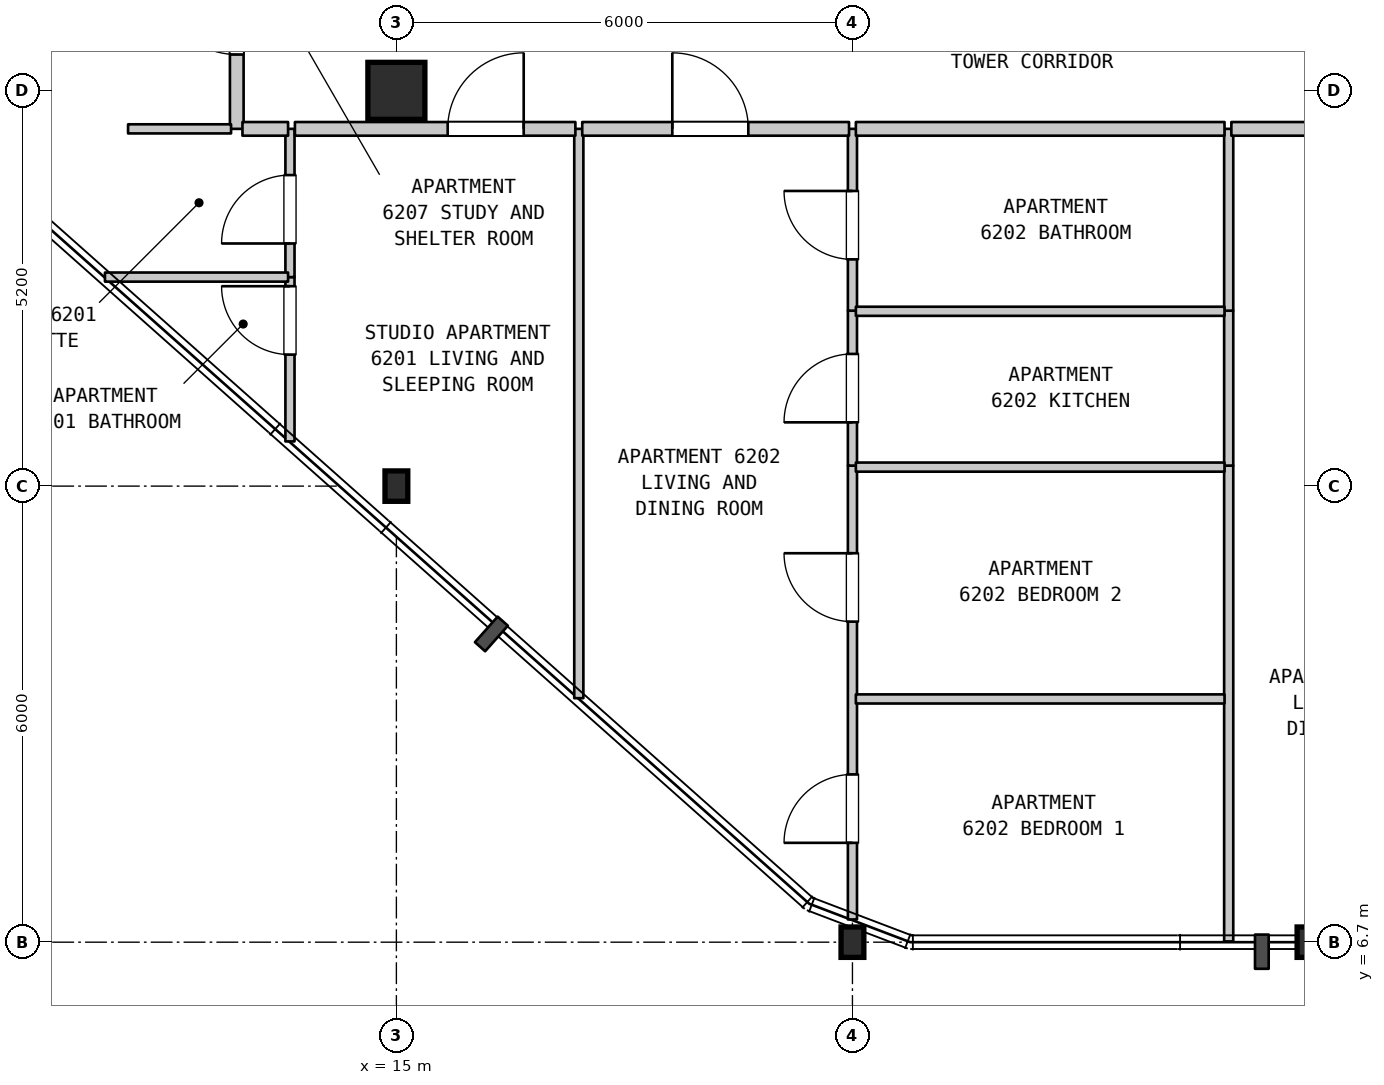
"""IFC4 building model, lengths in metres.
Left out: names, types, materials, properties, quantities, classifications, styles, units other than length and angle.
Written with IfcOpenShell. Run it as: python <this file> out.ifc"""

import sys

from ifc_helpers import new_model, si_unit, direction, frame, frame_2d, origin, origin_2d, place, context, subcontext, project, spatial, rectangle, i_section, extrude, element, fill, save


model = new_model("IFC4")
c1 = context("Model", 3, precision=1e-05, world=origin(), true_north=direction((0.0, 1.0)))
c2 = subcontext(c1, "Body", "Model", "MODEL_VIEW")
j1 = project(units=[si_unit("LENGTHUNIT", "METRE"), si_unit("PLANEANGLEUNIT", "RADIAN")], contexts=[c1])
p1 = place(None, origin())
s1 = spatial("IfcSite", under=j1, at=p1, CompositionType="ELEMENT")
p2 = place(p1, origin())
s2 = spatial("IfcBuilding", under=s1, at=p2, CompositionType="ELEMENT")
p3 = place(p2, frame((0.0, 0.0, 251.0)))
s3 = spatial("IfcBuildingStorey", under=s2, at=p3, CompositionType="ELEMENT", Elevation=251.0)
p4 = place(p3, frame((15.0, 12.7, 0.0), z_axis=(0.0, 0.0, 1.0), x_axis=(1.0, 0.0, 0.0)))
e1 = element("IfcColumn", 1, at=p4, inside=s3, PredefinedType="COLUMN", context=c2, shape_type="SweptSolid", body=[
    extrude(i_section(OverallWidth=0.3, OverallDepth=0.4, WebThickness=0.013, FlangeThickness=0.024, FilletRadius=0.027, at=origin_2d()), origin(), (0.0, 0.0, 1.0), 3.7),
])
p5 = place(p3, frame((15.0, 17.9, 0.0), z_axis=(0.0, 0.0, 1.0), x_axis=(1.0, 0.0, 0.0)))
e2 = element("IfcColumn", 2, at=p5, inside=s3, PredefinedType="COLUMN", context=c2, shape_type="SweptSolid", body=[
    extrude(rectangle(XDim=0.75, YDim=0.75, at=origin_2d()), origin(), (0.0, 0.0, 1.0), 3.7),
])
for number, where, z_axis, x_axis in (
    (3, (21.0, 6.7, 0.0), (0.0, 0.0, 1.0), (1.0, 0.0, 0.0)),
    (4, (27.0, 6.7, 0.0), (0.0, 0.0, 1.0), (1.0, 0.0, 0.0)),
):
    element("IfcColumn", number, at=place(p3, frame(where, z_axis=z_axis, x_axis=x_axis)), inside=s3, PredefinedType="COLUMN", context=c2, shape_type="SweptSolid", body=[
        extrude(i_section(OverallWidth=0.3, OverallDepth=0.4, WebThickness=0.013, FlangeThickness=0.024, FilletRadius=0.027, at=origin_2d()), origin(), (0.0, 0.0, 1.0), 3.7),
    ])
p6 = place(p3, frame((12.9, 17.4, 0.0), z_axis=(0.0, 0.0, 1.0), x_axis=(0.0, 1.0, 0.0)))
e5 = element("IfcWall", 5, at=p6, inside=s3, PredefinedType="STANDARD", context=c2, shape_type="SweptSolid", body=[
    extrude(rectangle(XDim=3.1, YDim=0.18, at=frame_2d((1.55, 0.0))), origin(), (0.0, 0.0, 1.0), 3.39),
])
p7 = place(p6, frame((0.978, 0.0, 0.0)))
e6 = element("IfcOpeningElement", 6, at=p7, cuts=e5, PredefinedType="OPENING", context=c2, shape_type="SweptSolid", body=[
    extrude(rectangle(XDim=1.0, YDim=2.15, at=frame_2d((0.5, 1.075))), frame((0.0, 0.1, 0.0), z_axis=(0.0, -1.0, 0.0), x_axis=(1.0, 0.0, 0.0)), (0.0, 0.0, 1.0), 0.2),
])
p8 = place(p3, frame((13.6, 13.288, 0.0), z_axis=(0.0, 0.0, 1.0), x_axis=(0.0, 1.0, 0.0)))
e7 = element("IfcWall", 7, at=p8, inside=s3, PredefinedType="PARTITIONING", context=c2, shape_type="SweptSolid", body=[
    extrude(rectangle(XDim=2.162, YDim=0.12, at=frame_2d((1.081, 0.0))), origin(), (0.0, 0.0, 1.0), 3.39),
])
p9 = place(p8, frame((1.142, 0.0, 0.0)))
e8 = element("IfcOpeningElement", 8, at=p9, cuts=e7, PredefinedType="OPENING", context=c2, shape_type="SweptSolid", body=[
    extrude(rectangle(XDim=0.9, YDim=2.1, at=frame_2d((0.45, 1.05))), frame((0.0, 0.07, 0.0), z_axis=(0.0, -1.0, 0.0), x_axis=(1.0, 0.0, 0.0)), (0.0, 0.0, 1.0), 0.14),
])
p10 = place(p3, frame((13.6, 15.45, 0.0), z_axis=(0.0, 0.0, 1.0), x_axis=(0.0, 1.0, 0.0)))
e9 = element("IfcWall", 9, at=p10, inside=s3, PredefinedType="PARTITIONING", context=c2, shape_type="SweptSolid", body=[
    extrude(rectangle(XDim=1.95, YDim=0.12, at=frame_2d((0.975, 0.0))), origin(), (0.0, 0.0, 1.0), 3.39),
])
p11 = place(p10, frame((0.442, 0.0, 0.0)))
e10 = element("IfcOpeningElement", 10, at=p11, cuts=e9, PredefinedType="OPENING", context=c2, shape_type="SweptSolid", body=[
    extrude(rectangle(XDim=0.9, YDim=2.15, at=frame_2d((0.45, 1.075))), frame((0.0, 0.07, 0.0), z_axis=(0.0, -1.0, 0.0), x_axis=(1.0, 0.0, 0.0)), (0.0, 0.0, 1.0), 0.14),
])
p12 = place(p3, frame((17.4, 9.91, 0.0), z_axis=(0.0, 0.0, 1.0), x_axis=(0.0, 1.0, 0.0)))
e11 = element("IfcWall", 11, at=p12, inside=s3, PredefinedType="PARTITIONING", context=c2, shape_type="SweptSolid", body=[
    extrude(rectangle(XDim=7.49, YDim=0.12, at=frame_2d((3.745, 0.0))), origin(), (0.0, 0.0, 1.0), 3.39),
])
p13 = place(p3, frame((21.0, 6.999, 0.0), z_axis=(0.0, 0.0, 1.0), x_axis=(0.0, 1.0, 0.0)))
e12 = element("IfcWall", 12, at=p13, inside=s3, PredefinedType="PARTITIONING", context=c2, shape_type="SweptSolid", body=[
    extrude(rectangle(XDim=5.971, YDim=0.12, at=frame_2d((2.985, 0.0))), origin(), (0.0, 0.0, 1.0), 3.39),
])
p14 = place(p13, frame((1.008, 0.0, 0.0)))
e13 = element("IfcOpeningElement", 13, at=p14, cuts=e12, PredefinedType="OPENING", context=c2, shape_type="SweptSolid", body=[
    extrude(rectangle(XDim=0.9, YDim=2.15, at=frame_2d((0.45, 1.075))), frame((0.0, 0.07, 0.0), z_axis=(0.0, -1.0, 0.0), x_axis=(1.0, 0.0, 0.0)), (0.0, 0.0, 1.0), 0.14),
])
p15 = place(p13, frame((3.918, 0.0, 0.0)))
e14 = element("IfcOpeningElement", 14, at=p15, cuts=e12, PredefinedType="OPENING", context=c2, shape_type="SweptSolid", body=[
    extrude(rectangle(XDim=0.9, YDim=2.15, at=frame_2d((0.45, 1.075))), frame((0.0, 0.07, 0.0), z_axis=(0.0, -1.0, 0.0), x_axis=(1.0, 0.0, 0.0)), (0.0, 0.0, 1.0), 0.14),
])
p16 = place(p3, frame((21.0, 12.97, 0.0), z_axis=(0.0, 0.0, 1.0), x_axis=(0.0, 1.0, 0.0)))
e15 = element("IfcWall", 15, at=p16, inside=s3, PredefinedType="PARTITIONING", context=c2, shape_type="SweptSolid", body=[
    extrude(rectangle(XDim=2.038, YDim=0.12, at=frame_2d((1.019, 0.0))), origin(), (0.0, 0.0, 1.0), 3.39),
])
p17 = place(p16, frame((0.569, 0.0, 0.0)))
e16 = element("IfcOpeningElement", 16, at=p17, cuts=e15, PredefinedType="OPENING", context=c2, shape_type="SweptSolid", body=[
    extrude(rectangle(XDim=0.9, YDim=2.15, at=frame_2d((0.45, 1.075))), frame((0.0, 0.07, 0.0), z_axis=(0.0, -1.0, 0.0), x_axis=(1.0, 0.0, 0.0)), (0.0, 0.0, 1.0), 0.14),
])
p18 = place(p3, frame((21.0, 15.008, 0.0), z_axis=(0.0, 0.0, 1.0), x_axis=(0.0, 1.0, 0.0)))
e17 = element("IfcWall", 17, at=p18, inside=s3, PredefinedType="PARTITIONING", context=c2, shape_type="SweptSolid", body=[
    extrude(rectangle(XDim=2.392, YDim=0.12, at=frame_2d((1.196, 0.0))), origin(), (0.0, 0.0, 1.0), 3.39),
])
p19 = place(p18, frame((0.675, 0.0, 0.0)))
e18 = element("IfcOpeningElement", 18, at=p19, cuts=e17, PredefinedType="OPENING", context=c2, shape_type="SweptSolid", body=[
    extrude(rectangle(XDim=0.9, YDim=2.1, at=frame_2d((0.45, 1.05))), frame((0.0, 0.07, 0.0), z_axis=(0.0, -1.0, 0.0), x_axis=(1.0, 0.0, 0.0)), (0.0, 0.0, 1.0), 0.14),
])
p20 = place(p3, frame((25.95, 6.71, 0.0), z_axis=(0.0, 0.0, 1.0), x_axis=(0.0, 1.0, 0.0)))
e19 = element("IfcWall", 19, at=p20, inside=s3, PredefinedType="PARTITIONING", context=c2, shape_type="SweptSolid", body=[
    extrude(rectangle(XDim=6.26, YDim=0.12, at=frame_2d((3.13, 0.0))), origin(), (0.0, 0.0, 1.0), 3.39),
])
p21 = place(p3, frame((25.95, 12.97, 0.0), z_axis=(0.0, 0.0, 1.0), x_axis=(0.0, 1.0, 0.0)))
e20 = element("IfcWall", 20, at=p21, inside=s3, PredefinedType="PARTITIONING", context=c2, shape_type="SweptSolid", body=[
    extrude(rectangle(XDim=2.038, YDim=0.12, at=frame_2d((1.019, 0.0))), origin(), (0.0, 0.0, 1.0), 3.39),
])
p22 = place(p3, frame((25.95, 15.008, 0.0), z_axis=(0.0, 0.0, 1.0), x_axis=(0.0, 1.0, 0.0)))
e21 = element("IfcWall", 21, at=p22, inside=s3, PredefinedType="PARTITIONING", context=c2, shape_type="SweptSolid", body=[
    extrude(rectangle(XDim=2.392, YDim=0.12, at=frame_2d((1.196, 0.0))), origin(), (0.0, 0.0, 1.0), 3.39),
])
for number, where, z_axis, x_axis in (
    (22, (21.045, 9.9, 0.0), (0.0, 0.0, 1.0), (1.0, 0.0, 0.0)),
    (23, (21.045, 12.95, 0.0), (0.0, 0.0, 1.0), (1.0, 0.0, 0.0)),
    (24, (21.045, 15.0, 0.0), (0.0, 0.0, 1.0), (1.0, 0.0, 0.0)),
):
    element("IfcWall", number, at=place(p3, frame(where, z_axis=z_axis, x_axis=x_axis)), inside=s3, PredefinedType="PARTITIONING", context=c2, shape_type="SweptSolid", body=[
        extrude(rectangle(XDim=4.85, YDim=0.12, at=frame_2d((2.425, 0.0))), origin(), (0.0, 0.0, 1.0), 3.39),
    ])
p23 = place(p3, frame((11.166, 15.45, 0.0), z_axis=(0.0, 0.0, 1.0), x_axis=(1.0, 0.0, 0.0)))
e25 = element("IfcWall", 25, at=p23, inside=s3, PredefinedType="PARTITIONING", context=c2, shape_type="SweptSolid", body=[
    extrude(rectangle(XDim=2.409, YDim=0.12, at=frame_2d((1.205, 0.0))), origin(), (0.0, 0.0, 1.0), 3.39),
])
p24 = place(p3, frame((11.47, 17.4, 0.0), z_axis=(0.0, 0.0, 1.0), x_axis=(1.0, 0.0, 0.0)))
e26 = element("IfcWall", 26, at=p24, inside=s3, PredefinedType="PARTITIONING", context=c2, shape_type="SweptSolid", body=[
    extrude(rectangle(XDim=1.355, YDim=0.12, at=frame_2d((0.677, 0.0))), origin(), (0.0, 0.0, 1.0), 3.39),
])
p25 = place(p3, frame((12.975, 17.4, 0.0), z_axis=(0.0, 0.0, 1.0), x_axis=(1.0, 0.0, 0.0)))
e27 = element("IfcWall", 27, at=p25, inside=s3, PredefinedType="STANDARD", context=c2, shape_type="SweptSolid", body=[
    extrude(rectangle(XDim=0.6, YDim=0.18, at=frame_2d((0.3, 0.0))), origin(), (0.0, 0.0, 1.0), 3.39),
])
p26 = place(p3, frame((13.665, 17.4, 0.0), z_axis=(0.0, 0.0, 1.0), x_axis=(1.0, 0.0, 0.0)))
e28 = element("IfcWall", 28, at=p26, inside=s3, PredefinedType="STANDARD", context=c2, shape_type="SweptSolid", body=[
    extrude(rectangle(XDim=3.69, YDim=0.18, at=frame_2d((1.845, 0.0))), origin(), (0.0, 0.0, 1.0), 3.39),
])
p27 = place(p26, frame((2.01, 0.0, 0.0)))
e29 = element("IfcOpeningElement", 29, at=p27, cuts=e28, PredefinedType="OPENING", context=c2, shape_type="SweptSolid", body=[
    extrude(rectangle(XDim=1.0, YDim=2.15, at=frame_2d((0.5, 1.075))), frame((0.0, 0.1, 0.0), z_axis=(0.0, -1.0, 0.0), x_axis=(1.0, 0.0, 0.0)), (0.0, 0.0, 1.0), 0.2),
])
p28 = place(p3, frame((17.445, 17.4, 0.0), z_axis=(0.0, 0.0, 1.0), x_axis=(1.0, 0.0, 0.0)))
e30 = element("IfcWall", 30, at=p28, inside=s3, PredefinedType="STANDARD", context=c2, shape_type="SweptSolid", body=[
    extrude(rectangle(XDim=3.51, YDim=0.18, at=frame_2d((1.755, 0.0))), origin(), (0.0, 0.0, 1.0), 3.39),
])
p29 = place(p28, frame((1.185, 0.0, 0.0)))
e31 = element("IfcOpeningElement", 31, at=p29, cuts=e30, PredefinedType="OPENING", context=c2, shape_type="SweptSolid", body=[
    extrude(rectangle(XDim=1.0, YDim=2.15, at=frame_2d((0.5, 1.075))), frame((0.0, 0.1, 0.0), z_axis=(0.0, -1.0, 0.0), x_axis=(1.0, 0.0, 0.0)), (0.0, 0.0, 1.0), 0.2),
])
p30 = place(p3, frame((21.045, 17.4, 0.0), z_axis=(0.0, 0.0, 1.0), x_axis=(1.0, 0.0, 0.0)))
e32 = element("IfcWall", 32, at=p30, inside=s3, PredefinedType="STANDARD", context=c2, shape_type="SweptSolid", body=[
    extrude(rectangle(XDim=4.85, YDim=0.18, at=frame_2d((2.425, 0.0))), origin(), (0.0, 0.0, 1.0), 3.39),
])
p31 = place(p3, frame((25.985, 17.4, 0.0), z_axis=(0.0, 0.0, 1.0), x_axis=(1.0, 0.0, 0.0)))
e33 = element("IfcWall", 33, at=p31, inside=s3, PredefinedType="STANDARD", context=c2, shape_type="SweptSolid", body=[
    extrude(rectangle(XDim=3.51, YDim=0.18, at=frame_2d((1.755, 0.0))), origin(), (0.0, 0.0, 1.0), 3.39),
])
p32 = place(p31, frame((1.255, 0.0, 0.0)))
e34 = element("IfcOpeningElement", 34, at=p32, cuts=e33, PredefinedType="OPENING", context=c2, shape_type="SweptSolid", body=[
    extrude(rectangle(XDim=1.0, YDim=2.15, at=frame_2d((0.5, 1.075))), frame((0.0, 0.1, 0.0), z_axis=(0.0, -1.0, 0.0), x_axis=(1.0, 0.0, 0.0)), (0.0, 0.0, 1.0), 0.2),
])
p33 = place(p7, origin())
e35 = element("IfcDoor", 35, at=p33, inside=s3, OperationType="SINGLE_SWING_RIGHT", PredefinedType="DOOR", context=c2, shape_type="SweptSolid", body=[
    extrude(rectangle(XDim=1.0, YDim=2.15, at=frame_2d((0.5, 1.075))), frame((0.0, 0.025, 0.0), z_axis=(0.0, -1.0, 0.0), x_axis=(1.0, 0.0, 0.0)), (0.0, 0.0, 1.0), 0.05),
])
fill(e6, e35)
p34 = place(p9, origin())
e36 = element("IfcDoor", 36, at=p34, inside=s3, OperationType="SINGLE_SWING_RIGHT", PredefinedType="DOOR", context=c2, shape_type="SweptSolid", body=[
    extrude(rectangle(XDim=0.9, YDim=2.1, at=frame_2d((0.45, 1.05))), frame((0.0, 0.025, 0.0), z_axis=(0.0, -1.0, 0.0), x_axis=(1.0, 0.0, 0.0)), (0.0, 0.0, 1.0), 0.05),
])
fill(e8, e36)
p35 = place(p11, origin())
e37 = element("IfcDoor", 37, at=p35, inside=s3, OperationType="SINGLE_SWING_LEFT", PredefinedType="DOOR", context=c2, shape_type="SweptSolid", body=[
    extrude(rectangle(XDim=0.9, YDim=2.15, at=frame_2d((0.45, 1.075))), frame((0.0, 0.025, 0.0), z_axis=(0.0, -1.0, 0.0), x_axis=(1.0, 0.0, 0.0)), (0.0, 0.0, 1.0), 0.05),
])
fill(e10, e37)
p36 = place(p14, origin())
e38 = element("IfcDoor", 38, at=p36, inside=s3, OperationType="SINGLE_SWING_LEFT", PredefinedType="DOOR", context=c2, shape_type="SweptSolid", body=[
    extrude(rectangle(XDim=0.9, YDim=2.15, at=frame_2d((0.45, 1.075))), frame((0.0, 0.025, 0.0), z_axis=(0.0, -1.0, 0.0), x_axis=(1.0, 0.0, 0.0)), (0.0, 0.0, 1.0), 0.05),
])
fill(e13, e38)
p37 = place(p15, origin())
e39 = element("IfcDoor", 39, at=p37, inside=s3, OperationType="SINGLE_SWING_RIGHT", PredefinedType="DOOR", context=c2, shape_type="SweptSolid", body=[
    extrude(rectangle(XDim=0.9, YDim=2.15, at=frame_2d((0.45, 1.075))), frame((0.0, 0.025, 0.0), z_axis=(0.0, -1.0, 0.0), x_axis=(1.0, 0.0, 0.0)), (0.0, 0.0, 1.0), 0.05),
])
fill(e14, e39)
p38 = place(p17, origin())
e40 = element("IfcDoor", 40, at=p38, inside=s3, OperationType="SINGLE_SWING_LEFT", PredefinedType="DOOR", context=c2, shape_type="SweptSolid", body=[
    extrude(rectangle(XDim=0.9, YDim=2.15, at=frame_2d((0.45, 1.075))), frame((0.0, 0.025, 0.0), z_axis=(0.0, -1.0, 0.0), x_axis=(1.0, 0.0, 0.0)), (0.0, 0.0, 1.0), 0.05),
])
fill(e16, e40)
p39 = place(p19, origin())
e41 = element("IfcDoor", 41, at=p39, inside=s3, OperationType="SINGLE_SWING_RIGHT", PredefinedType="DOOR", context=c2, shape_type="SweptSolid", body=[
    extrude(rectangle(XDim=0.9, YDim=2.1, at=frame_2d((0.45, 1.05))), frame((0.0, 0.025, 0.0), z_axis=(0.0, -1.0, 0.0), x_axis=(1.0, 0.0, 0.0)), (0.0, 0.0, 1.0), 0.05),
])
fill(e18, e41)
p40 = place(p27, origin())
e42 = element("IfcDoor", 42, at=p40, inside=s3, OperationType="SINGLE_SWING_RIGHT", PredefinedType="DOOR", context=c2, shape_type="SweptSolid", body=[
    extrude(rectangle(XDim=1.0, YDim=2.15, at=frame_2d((0.5, 1.075))), frame((0.0, 0.025, 0.0), z_axis=(0.0, -1.0, 0.0), x_axis=(1.0, 0.0, 0.0)), (0.0, 0.0, 1.0), 0.05),
])
fill(e29, e42)
p41 = place(p29, origin())
e43 = element("IfcDoor", 43, at=p41, inside=s3, OperationType="SINGLE_SWING_LEFT", PredefinedType="DOOR", context=c2, shape_type="SweptSolid", body=[
    extrude(rectangle(XDim=1.0, YDim=2.15, at=frame_2d((0.5, 1.075))), frame((0.0, 0.025, 0.0), z_axis=(0.0, -1.0, 0.0), x_axis=(1.0, 0.0, 0.0)), (0.0, 0.0, 1.0), 0.05),
])
fill(e31, e43)
save(model, sys.argv[1])
